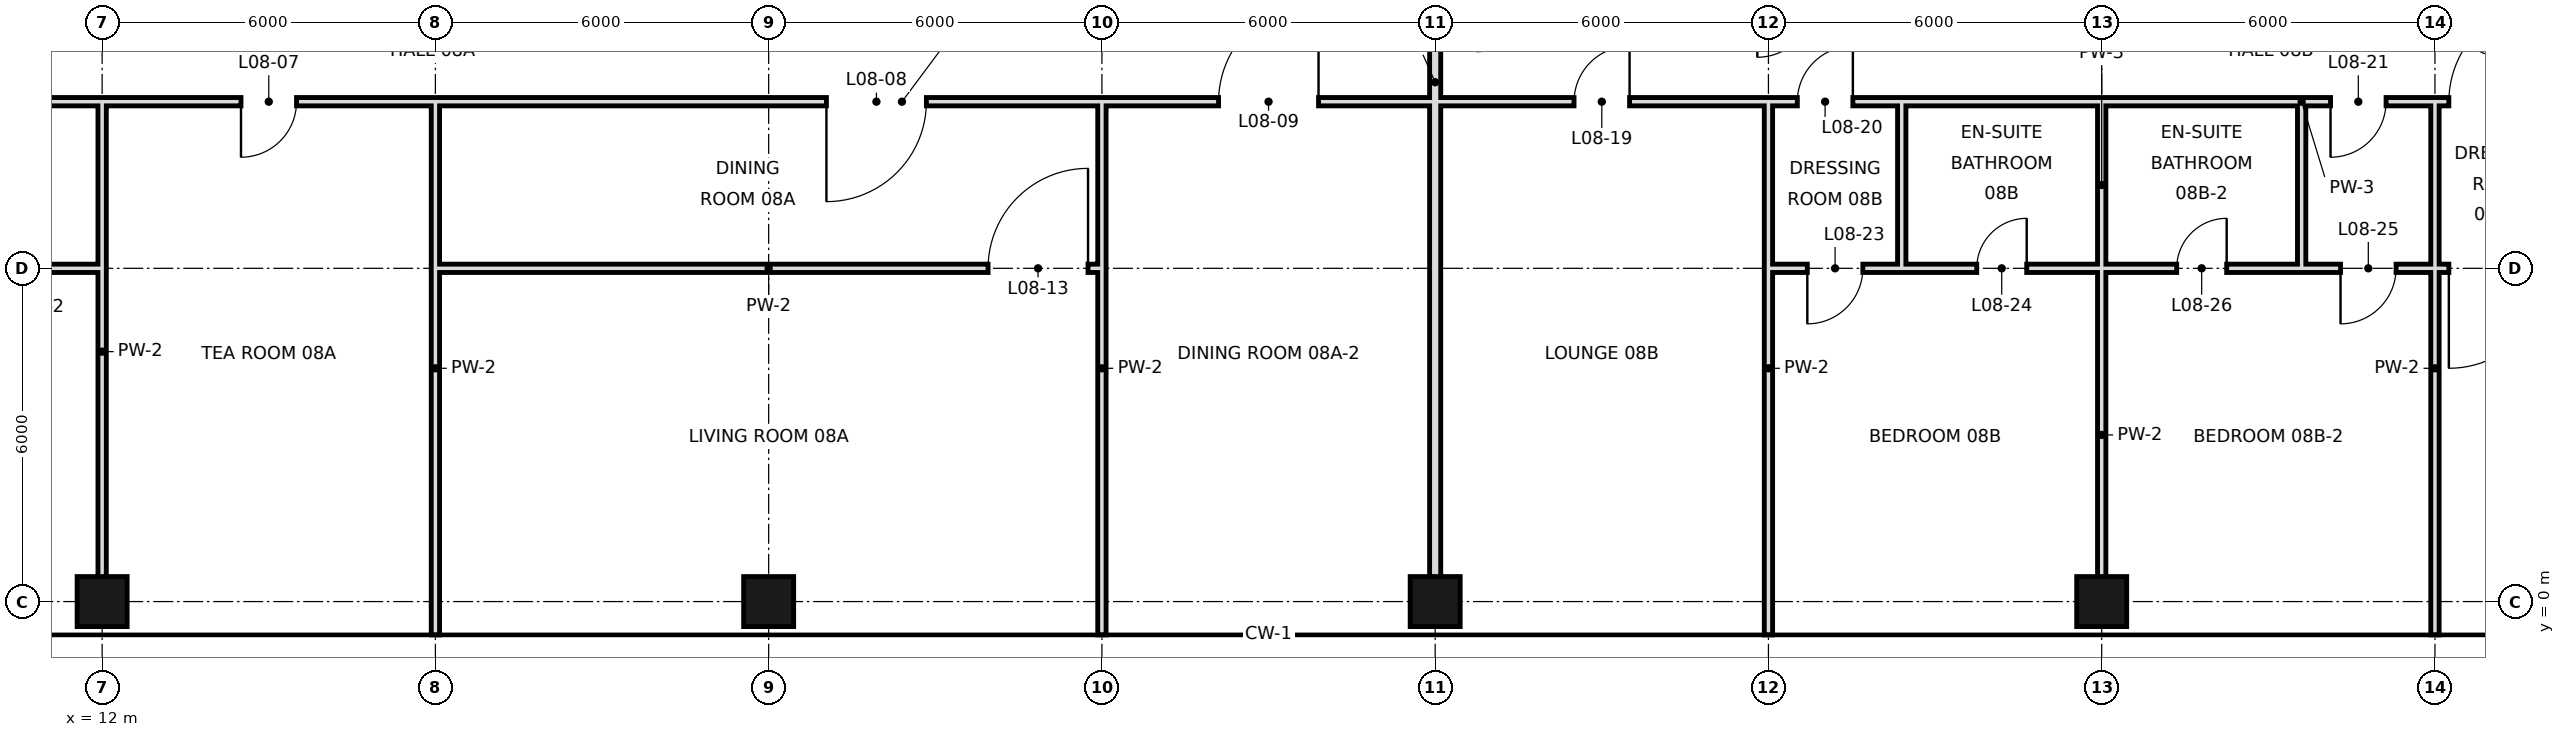
"""IFC4 building model, lengths in metres.
Left out: names, types, materials, properties, quantities, classifications, styles, units other than length and angle.
Written with IfcOpenShell. Run it as: python <this file> out.ifc"""

import sys

from ifc_helpers import new_model, si_unit, direction, frame, frame_2d, origin, origin_2d, place, context, subcontext, project, spatial, rectangle, hollow_rectangle, extrude, element, fill, save


model = new_model("IFC4")
c1 = context("Model", 3, precision=1e-05, world=origin(), true_north=direction((0.0, 1.0)))
c2 = subcontext(c1, "Body", "Model", "MODEL_VIEW")
j1 = project(units=[si_unit("LENGTHUNIT", "METRE"), si_unit("PLANEANGLEUNIT", "RADIAN")], contexts=[c1])
p1 = place(None, origin())
s1 = spatial("IfcSite", under=j1, at=p1, CompositionType="ELEMENT")
p2 = place(p1, origin())
s2 = spatial("IfcBuilding", under=s1, at=p2, CompositionType="ELEMENT")
p3 = place(p2, frame((0.0, 0.0, 49.8)))
s3 = spatial("IfcBuildingStorey", under=s2, at=p3, CompositionType="ELEMENT", Elevation=49.8)
for number, where, z_axis, x_axis in (
    (1, (12.0, 0.0, 0.0), (0.0, 0.0, 1.0), (1.0, 0.0, 0.0)),
    (2, (24.0, 0.0, 0.0), (0.0, 0.0, 1.0), (1.0, 0.0, 0.0)),
    (3, (36.0, 0.0, 0.0), (0.0, 0.0, 1.0), (1.0, 0.0, 0.0)),
    (4, (48.0, 0.0, 0.0), (0.0, 0.0, 1.0), (1.0, 0.0, 0.0)),
):
    element("IfcColumn", number, at=place(p3, frame(where, z_axis=z_axis, x_axis=x_axis)), inside=s3, PredefinedType="COLUMN", context=c2, shape_type="SweptSolid", body=[
        extrude(hollow_rectangle(XDim=0.9, YDim=0.9, WallThickness=0.045, at=origin_2d()), origin(), (0.0, 0.0, 1.0), 3.6),
    ])
p4 = place(p3, frame((12.0, 0.0, 0.0), z_axis=(0.0, 0.0, 1.0), x_axis=(0.0, 1.0, 0.0)))
e5 = element("IfcWall", 5, at=p4, inside=s3, PredefinedType="PARTITIONING", context=c2, shape_type="SweptSolid", body=[
    extrude(rectangle(XDim=9.0, YDim=0.15, at=frame_2d((4.5, 0.0))), origin(), (0.0, 0.0, 1.0), 2.72),
])
for number, where, z_axis, x_axis in (
    (6, (18.0, -0.6, 0.0), (0.0, 0.0, 1.0), (0.0, 1.0, 0.0)),
    (7, (30.0, -0.6, 0.0), (0.0, 0.0, 1.0), (0.0, 1.0, 0.0)),
):
    element("IfcWall", number, at=place(p3, frame(where, z_axis=z_axis, x_axis=x_axis)), inside=s3, PredefinedType="PARTITIONING", context=c2, shape_type="SweptSolid", body=[
        extrude(rectangle(XDim=9.6, YDim=0.15, at=frame_2d((4.8, 0.0))), origin(), (0.0, 0.0, 1.0), 2.72),
    ])
p5 = place(p3, frame((36.0, 0.0, 0.0), z_axis=(0.0, 0.0, 1.0), x_axis=(0.0, 1.0, 0.0)))
e8 = element("IfcWall", 8, at=p5, inside=s3, PredefinedType="SOLIDWALL", context=c2, shape_type="SweptSolid", body=[
    extrude(rectangle(XDim=18.7, YDim=0.2, at=frame_2d((9.35, 0.0))), origin(), (0.0, 0.0, 1.0), 2.72),
])
p6 = place(p3, frame((42.0, -0.6, 0.0), z_axis=(0.0, 0.0, 1.0), x_axis=(0.0, 1.0, 0.0)))
e9 = element("IfcWall", 9, at=p6, inside=s3, PredefinedType="PARTITIONING", context=c2, shape_type="SweptSolid", body=[
    extrude(rectangle(XDim=9.6, YDim=0.15, at=frame_2d((4.8, 0.0))), origin(), (0.0, 0.0, 1.0), 2.72),
])
p7 = place(p3, frame((44.4, 6.0, 0.0), z_axis=(0.0, 0.0, 1.0), x_axis=(0.0, 1.0, 0.0)))
e10 = element("IfcWall", 10, at=p7, inside=s3, PredefinedType="PARTITIONING", context=c2, shape_type="SweptSolid", body=[
    extrude(rectangle(XDim=3.0, YDim=0.15, at=frame_2d((1.5, 0.0))), origin(), (0.0, 0.0, 1.0), 3.42),
])
p8 = place(p3, frame((48.0, 0.0, 0.0), z_axis=(0.0, 0.0, 1.0), x_axis=(0.0, 1.0, 0.0)))
e11 = element("IfcWall", 11, at=p8, inside=s3, PredefinedType="PARTITIONING", context=c2, shape_type="SweptSolid", body=[
    extrude(rectangle(XDim=6.0, YDim=0.15, at=frame_2d((3.0, 0.0))), origin(), (0.0, 0.0, 1.0), 2.72),
])
p9 = place(p3, frame((48.0, 6.0, 0.0), z_axis=(0.0, 0.0, 1.0), x_axis=(0.0, 1.0, 0.0)))
e12 = element("IfcWall", 12, at=p9, inside=s3, PredefinedType="PARTITIONING", context=c2, shape_type="SweptSolid", body=[
    extrude(rectangle(XDim=3.0, YDim=0.15, at=frame_2d((1.5, 0.0))), origin(), (0.0, 0.0, 1.0), 2.72),
])
p10 = place(p3, frame((51.6, 6.0, 0.0), z_axis=(0.0, 0.0, 1.0), x_axis=(0.0, 1.0, 0.0)))
e13 = element("IfcWall", 13, at=p10, inside=s3, PredefinedType="PARTITIONING", context=c2, shape_type="SweptSolid", body=[
    extrude(rectangle(XDim=3.0, YDim=0.15, at=frame_2d((1.5, 0.0))), origin(), (0.0, 0.0, 1.0), 3.42),
])
p11 = place(p3, frame((54.0, -0.6, 0.0), z_axis=(0.0, 0.0, 1.0), x_axis=(0.0, 1.0, 0.0)))
e14 = element("IfcWall", 14, at=p11, inside=s3, PredefinedType="PARTITIONING", context=c2, shape_type="SweptSolid", body=[
    extrude(rectangle(XDim=9.6, YDim=0.15, at=frame_2d((4.8, 0.0))), origin(), (0.0, 0.0, 1.0), 3.42),
])
p12 = place(p3, frame((8.4, 6.0, 0.0), z_axis=(0.0, 0.0, 1.0), x_axis=(1.0, 0.0, 0.0)))
e15 = element("IfcWall", 15, at=p12, inside=s3, PredefinedType="PARTITIONING", context=c2, shape_type="SweptSolid", body=[
    extrude(rectangle(XDim=3.6, YDim=0.15, at=frame_2d((1.8, 0.0))), origin(), (0.0, 0.0, 1.0), 2.97),
])
p13 = place(p12, frame((0.88, 0.0, 0.0)))
e16 = element("IfcOpeningElement", 16, at=p13, cuts=e15, PredefinedType="OPENING", context=c2, shape_type="SweptSolid", body=[
    extrude(rectangle(XDim=1.0, YDim=2.4, at=frame_2d((0.5, 1.2))), frame((0.0, 0.085, 0.0), z_axis=(0.0, -1.0, 0.0), x_axis=(1.0, 0.0, 0.0)), (0.0, 0.0, 1.0), 0.17),
])
p14 = place(p3, frame((18.0, 6.0, 0.0), z_axis=(0.0, 0.0, 1.0), x_axis=(1.0, 0.0, 0.0)))
e17 = element("IfcWall", 17, at=p14, inside=s3, PredefinedType="PARTITIONING", context=c2, shape_type="SweptSolid", body=[
    extrude(rectangle(XDim=12.0, YDim=0.15, at=frame_2d((6.0, 0.0))), origin(), (0.0, 0.0, 1.0), 2.97),
])
p15 = place(p14, frame((9.95, 0.0, 0.0)))
e18 = element("IfcOpeningElement", 18, at=p15, cuts=e17, PredefinedType="OPENING", context=c2, shape_type="SweptSolid", body=[
    extrude(rectangle(XDim=1.8, YDim=2.4, at=frame_2d((0.9, 1.2))), frame((0.0, 0.085, 0.0), z_axis=(0.0, -1.0, 0.0), x_axis=(1.0, 0.0, 0.0)), (0.0, 0.0, 1.0), 0.17),
])
p16 = place(p3, frame((42.0, 6.0, 0.0), z_axis=(0.0, 0.0, 1.0), x_axis=(1.0, 0.0, 0.0)))
e19 = element("IfcWall", 19, at=p16, inside=s3, PredefinedType="PARTITIONING", context=c2, shape_type="SweptSolid", body=[
    extrude(rectangle(XDim=2.4, YDim=0.15, at=frame_2d((1.2, 0.0))), origin(), (0.0, 0.0, 1.0), 2.97),
])
p17 = place(p16, frame((0.7, 0.0, 0.0)))
e20 = element("IfcOpeningElement", 20, at=p17, cuts=e19, PredefinedType="OPENING", context=c2, shape_type="SweptSolid", body=[
    extrude(rectangle(XDim=1.0, YDim=2.4, at=frame_2d((0.5, 1.2))), frame((0.0, 0.085, 0.0), z_axis=(0.0, -1.0, 0.0), x_axis=(1.0, 0.0, 0.0)), (0.0, 0.0, 1.0), 0.17),
])
p18 = place(p3, frame((51.6, 6.0, 0.0), z_axis=(0.0, 0.0, 1.0), x_axis=(1.0, 0.0, 0.0)))
e21 = element("IfcWall", 21, at=p18, inside=s3, PredefinedType="PARTITIONING", context=c2, shape_type="SweptSolid", body=[
    extrude(rectangle(XDim=14.4, YDim=0.15, at=frame_2d((7.2, 0.0))), origin(), (0.0, 0.0, 1.0), 2.52),
])
p19 = place(p18, frame((0.7, 0.0, 0.0)))
e22 = element("IfcOpeningElement", 22, at=p19, cuts=e21, PredefinedType="OPENING", context=c2, shape_type="SweptSolid", body=[
    extrude(rectangle(XDim=1.0, YDim=2.4, at=frame_2d((0.5, 1.2))), frame((0.0, 0.085, 0.0), z_axis=(0.0, -1.0, 0.0), x_axis=(1.0, 0.0, 0.0)), (0.0, 0.0, 1.0), 0.17),
])
p20 = place(p18, frame((2.65, 0.0, 0.0)))
e23 = element("IfcOpeningElement", 23, at=p20, cuts=e21, PredefinedType="OPENING", context=c2, shape_type="SweptSolid", body=[
    extrude(rectangle(XDim=1.8, YDim=2.4, at=frame_2d((0.9, 1.2))), frame((0.0, 0.085, 0.0), z_axis=(0.0, -1.0, 0.0), x_axis=(1.0, 0.0, 0.0)), (0.0, 0.0, 1.0), 0.17),
])
p21 = place(p3, frame((44.4, 6.0, 0.0), z_axis=(0.0, 0.0, 1.0), x_axis=(1.0, 0.0, 0.0)))
e24 = element("IfcWall", 24, at=p21, inside=s3, PredefinedType="PARTITIONING", context=c2, shape_type="SweptSolid", body=[
    extrude(rectangle(XDim=7.2, YDim=0.15, at=frame_2d((3.6, 0.0))), origin(), (0.0, 0.0, 1.0), 2.52),
])
p22 = place(p21, frame((1.35, 0.0, 0.0)))
e25 = element("IfcOpeningElement", 25, at=p22, cuts=e24, PredefinedType="OPENING", context=c2, shape_type="SweptSolid", body=[
    extrude(rectangle(XDim=0.9, YDim=2.4, at=frame_2d((0.45, 1.2))), frame((0.0, 0.085, 0.0), z_axis=(0.0, -1.0, 0.0), x_axis=(1.0, 0.0, 0.0)), (0.0, 0.0, 1.0), 0.17),
])
p23 = place(p21, frame((4.95, 0.0, 0.0)))
e26 = element("IfcOpeningElement", 26, at=p23, cuts=e24, PredefinedType="OPENING", context=c2, shape_type="SweptSolid", body=[
    extrude(rectangle(XDim=0.9, YDim=2.4, at=frame_2d((0.45, 1.2))), frame((0.0, 0.085, 0.0), z_axis=(0.0, -1.0, 0.0), x_axis=(1.0, 0.0, 0.0)), (0.0, 0.0, 1.0), 0.17),
])
p24 = place(p3, frame((8.4, 9.0, 0.0), z_axis=(0.0, 0.0, 1.0), x_axis=(1.0, 0.0, 0.0)))
e27 = element("IfcWall", 27, at=p24, inside=s3, PredefinedType="PARTITIONING", context=c2, shape_type="SweptSolid", body=[
    extrude(rectangle(XDim=36.0, YDim=0.15, at=frame_2d((18.0, 0.0))), origin(), (0.0, 0.0, 1.0), 3.42),
])
p25 = place(p24, frame((0.88, 0.0, 0.0)))
e28 = element("IfcOpeningElement", 28, at=p25, cuts=e27, PredefinedType="OPENING", context=c2, shape_type="SweptSolid", body=[
    extrude(rectangle(XDim=1.0, YDim=2.4, at=frame_2d((0.5, 1.2))), frame((0.0, 0.085, 0.0), z_axis=(0.0, -1.0, 0.0), x_axis=(1.0, 0.0, 0.0)), (0.0, 0.0, 1.0), 0.17),
])
p26 = place(p24, frame((6.1, 0.0, 0.0)))
e29 = element("IfcOpeningElement", 29, at=p26, cuts=e27, PredefinedType="OPENING", context=c2, shape_type="SweptSolid", body=[
    extrude(rectangle(XDim=1.0, YDim=2.4, at=frame_2d((0.5, 1.2))), frame((0.0, 0.085, 0.0), z_axis=(0.0, -1.0, 0.0), x_axis=(1.0, 0.0, 0.0)), (0.0, 0.0, 1.0), 0.17),
])
p27 = place(p24, frame((16.64, 0.0, 0.0)))
e30 = element("IfcOpeningElement", 30, at=p27, cuts=e27, PredefinedType="OPENING", context=c2, shape_type="SweptSolid", body=[
    extrude(rectangle(XDim=1.8, YDim=2.4, at=frame_2d((0.9, 1.2))), frame((0.0, 0.085, 0.0), z_axis=(0.0, -1.0, 0.0), x_axis=(1.0, 0.0, 0.0)), (0.0, 0.0, 1.0), 0.17),
])
p28 = place(p24, frame((23.7, 0.0, 0.0)))
e31 = element("IfcOpeningElement", 31, at=p28, cuts=e27, PredefinedType="OPENING", context=c2, shape_type="SweptSolid", body=[
    extrude(rectangle(XDim=1.8, YDim=2.4, at=frame_2d((0.9, 1.2))), frame((0.0, 0.085, 0.0), z_axis=(0.0, -1.0, 0.0), x_axis=(1.0, 0.0, 0.0)), (0.0, 0.0, 1.0), 0.17),
])
p29 = place(p24, frame((30.1, 0.0, 0.0)))
e32 = element("IfcOpeningElement", 32, at=p29, cuts=e27, PredefinedType="OPENING", context=c2, shape_type="SweptSolid", body=[
    extrude(rectangle(XDim=1.0, YDim=2.4, at=frame_2d((0.5, 1.2))), frame((0.0, 0.085, 0.0), z_axis=(0.0, -1.0, 0.0), x_axis=(1.0, 0.0, 0.0)), (0.0, 0.0, 1.0), 0.17),
])
p30 = place(p24, frame((34.12, 0.0, 0.0)))
e33 = element("IfcOpeningElement", 33, at=p30, cuts=e27, PredefinedType="OPENING", context=c2, shape_type="SweptSolid", body=[
    extrude(rectangle(XDim=1.0, YDim=2.4, at=frame_2d((0.5, 1.2))), frame((0.0, 0.085, 0.0), z_axis=(0.0, -1.0, 0.0), x_axis=(1.0, 0.0, 0.0)), (0.0, 0.0, 1.0), 0.17),
])
p31 = place(p3, frame((51.6, 9.0, 0.0), z_axis=(0.0, 0.0, 1.0), x_axis=(1.0, 0.0, 0.0)))
e34 = element("IfcWall", 34, at=p31, inside=s3, PredefinedType="PARTITIONING", context=c2, shape_type="SweptSolid", body=[
    extrude(rectangle(XDim=15.0, YDim=0.15, at=frame_2d((7.5, 0.0))), origin(), (0.0, 0.0, 1.0), 3.42),
])
p32 = place(p31, frame((0.52, 0.0, 0.0)))
e35 = element("IfcOpeningElement", 35, at=p32, cuts=e34, PredefinedType="OPENING", context=c2, shape_type="SweptSolid", body=[
    extrude(rectangle(XDim=1.0, YDim=2.4, at=frame_2d((0.5, 1.2))), frame((0.0, 0.085, 0.0), z_axis=(0.0, -1.0, 0.0), x_axis=(1.0, 0.0, 0.0)), (0.0, 0.0, 1.0), 0.17),
])
p33 = place(p31, frame((2.65, 0.0, 0.0)))
e36 = element("IfcOpeningElement", 36, at=p33, cuts=e34, PredefinedType="OPENING", context=c2, shape_type="SweptSolid", body=[
    extrude(rectangle(XDim=1.8, YDim=2.4, at=frame_2d((0.9, 1.2))), frame((0.0, 0.085, 0.0), z_axis=(0.0, -1.0, 0.0), x_axis=(1.0, 0.0, 0.0)), (0.0, 0.0, 1.0), 0.17),
])
p34 = place(p3, frame((44.4, 9.0, 0.0), z_axis=(0.0, 0.0, 1.0), x_axis=(1.0, 0.0, 0.0)))
e37 = element("IfcWall", 37, at=p34, inside=s3, PredefinedType="PARTITIONING", context=c2, shape_type="SweptSolid", body=[
    extrude(rectangle(XDim=7.2, YDim=0.15, at=frame_2d((3.6, 0.0))), origin(), (0.0, 0.0, 1.0), 3.42),
])
p35 = place(p26, frame((1.0, 0.0, 0.0), z_axis=(0.0, 0.0, 1.0), x_axis=(-1.0, 0.0, 0.0)))
e38 = element("IfcDoor", 38, at=p35, inside=s3, OperationType="SINGLE_SWING_RIGHT", PredefinedType="DOOR", context=c2, shape_type="SweptSolid", body=[
    extrude(rectangle(XDim=1.0, YDim=2.4, at=frame_2d((0.5, 1.2))), frame((0.0, 0.025, 0.0), z_axis=(0.0, -1.0, 0.0), x_axis=(1.0, 0.0, 0.0)), (0.0, 0.0, 1.0), 0.05),
])
fill(e29, e38)
p36 = place(p27, frame((1.8, 0.0, 0.0), z_axis=(0.0, 0.0, 1.0), x_axis=(-1.0, 0.0, 0.0)))
e39 = element("IfcDoor", 39, at=p36, inside=s3, OperationType="SINGLE_SWING_RIGHT", PredefinedType="DOOR", context=c2, shape_type="SweptSolid", body=[
    extrude(rectangle(XDim=1.8, YDim=2.4, at=frame_2d((0.9, 1.2))), frame((0.0, 0.025, 0.0), z_axis=(0.0, -1.0, 0.0), x_axis=(1.0, 0.0, 0.0)), (0.0, 0.0, 1.0), 0.05),
])
fill(e30, e39)
p37 = place(p28, frame((1.8, 0.0, 0.0), z_axis=(0.0, 0.0, 1.0), x_axis=(-1.0, 0.0, 0.0)))
e40 = element("IfcDoor", 40, at=p37, inside=s3, OperationType="SINGLE_SWING_LEFT", PredefinedType="DOOR", context=c2, shape_type="SweptSolid", body=[
    extrude(rectangle(XDim=1.8, YDim=2.4, at=frame_2d((0.9, 1.2))), frame((0.0, 0.025, 0.0), z_axis=(0.0, -1.0, 0.0), x_axis=(1.0, 0.0, 0.0)), (0.0, 0.0, 1.0), 0.05),
])
fill(e31, e40)
p38 = place(p15, frame((1.8, 0.0, 0.0), z_axis=(0.0, 0.0, 1.0), x_axis=(-1.0, 0.0, 0.0)))
e41 = element("IfcDoor", 41, at=p38, inside=s3, OperationType="SINGLE_SWING_LEFT", PredefinedType="DOOR", context=c2, shape_type="SweptSolid", body=[
    extrude(rectangle(XDim=1.8, YDim=2.4, at=frame_2d((0.9, 1.2))), frame((0.0, 0.025, 0.0), z_axis=(0.0, -1.0, 0.0), x_axis=(1.0, 0.0, 0.0)), (0.0, 0.0, 1.0), 0.05),
])
fill(e18, e41)
p39 = place(p29, frame((1.0, 0.0, 0.0), z_axis=(0.0, 0.0, 1.0), x_axis=(-1.0, 0.0, 0.0)))
e42 = element("IfcDoor", 42, at=p39, inside=s3, OperationType="SINGLE_SWING_LEFT", PredefinedType="DOOR", context=c2, shape_type="SweptSolid", body=[
    extrude(rectangle(XDim=1.0, YDim=2.4, at=frame_2d((0.5, 1.2))), frame((0.0, 0.025, 0.0), z_axis=(0.0, -1.0, 0.0), x_axis=(1.0, 0.0, 0.0)), (0.0, 0.0, 1.0), 0.05),
])
fill(e32, e42)
p40 = place(p30, frame((1.0, 0.0, 0.0), z_axis=(0.0, 0.0, 1.0), x_axis=(-1.0, 0.0, 0.0)))
e43 = element("IfcDoor", 43, at=p40, inside=s3, OperationType="SINGLE_SWING_LEFT", PredefinedType="DOOR", context=c2, shape_type="SweptSolid", body=[
    extrude(rectangle(XDim=1.0, YDim=2.4, at=frame_2d((0.5, 1.2))), frame((0.0, 0.025, 0.0), z_axis=(0.0, -1.0, 0.0), x_axis=(1.0, 0.0, 0.0)), (0.0, 0.0, 1.0), 0.05),
])
fill(e33, e43)
p41 = place(p32, frame((1.0, 0.0, 0.0), z_axis=(0.0, 0.0, 1.0), x_axis=(-1.0, 0.0, 0.0)))
e44 = element("IfcDoor", 44, at=p41, inside=s3, OperationType="SINGLE_SWING_RIGHT", PredefinedType="DOOR", context=c2, shape_type="SweptSolid", body=[
    extrude(rectangle(XDim=1.0, YDim=2.4, at=frame_2d((0.5, 1.2))), frame((0.0, 0.025, 0.0), z_axis=(0.0, -1.0, 0.0), x_axis=(1.0, 0.0, 0.0)), (0.0, 0.0, 1.0), 0.05),
])
fill(e35, e44)
p42 = place(p33, frame((1.8, 0.0, 0.0), z_axis=(0.0, 0.0, 1.0), x_axis=(-1.0, 0.0, 0.0)))
e45 = element("IfcDoor", 45, at=p42, inside=s3, OperationType="SINGLE_SWING_LEFT", PredefinedType="DOOR", context=c2, shape_type="SweptSolid", body=[
    extrude(rectangle(XDim=1.8, YDim=2.4, at=frame_2d((0.9, 1.2))), frame((0.0, 0.025, 0.0), z_axis=(0.0, -1.0, 0.0), x_axis=(1.0, 0.0, 0.0)), (0.0, 0.0, 1.0), 0.05),
])
fill(e36, e45)
p43 = place(p17, frame((1.0, 0.0, 0.0), z_axis=(0.0, 0.0, 1.0), x_axis=(-1.0, 0.0, 0.0)))
e46 = element("IfcDoor", 46, at=p43, inside=s3, OperationType="SINGLE_SWING_RIGHT", PredefinedType="DOOR", context=c2, shape_type="SweptSolid", body=[
    extrude(rectangle(XDim=1.0, YDim=2.4, at=frame_2d((0.5, 1.2))), frame((0.0, 0.025, 0.0), z_axis=(0.0, -1.0, 0.0), x_axis=(1.0, 0.0, 0.0)), (0.0, 0.0, 1.0), 0.05),
])
fill(e20, e46)
p44 = place(p22, frame((0.9, 0.0, 0.0), z_axis=(0.0, 0.0, 1.0), x_axis=(-1.0, 0.0, 0.0)))
e47 = element("IfcDoor", 47, at=p44, inside=s3, OperationType="SINGLE_SWING_LEFT", PredefinedType="DOOR", context=c2, shape_type="SweptSolid", body=[
    extrude(rectangle(XDim=0.9, YDim=2.4, at=frame_2d((0.45, 1.2))), frame((0.0, 0.025, 0.0), z_axis=(0.0, -1.0, 0.0), x_axis=(1.0, 0.0, 0.0)), (0.0, 0.0, 1.0), 0.05),
])
fill(e25, e47)
p45 = place(p19, frame((1.0, 0.0, 0.0), z_axis=(0.0, 0.0, 1.0), x_axis=(-1.0, 0.0, 0.0)))
e48 = element("IfcDoor", 48, at=p45, inside=s3, OperationType="SINGLE_SWING_RIGHT", PredefinedType="DOOR", context=c2, shape_type="SweptSolid", body=[
    extrude(rectangle(XDim=1.0, YDim=2.4, at=frame_2d((0.5, 1.2))), frame((0.0, 0.025, 0.0), z_axis=(0.0, -1.0, 0.0), x_axis=(1.0, 0.0, 0.0)), (0.0, 0.0, 1.0), 0.05),
])
fill(e22, e48)
p46 = place(p23, frame((0.9, 0.0, 0.0), z_axis=(0.0, 0.0, 1.0), x_axis=(-1.0, 0.0, 0.0)))
e49 = element("IfcDoor", 49, at=p46, inside=s3, OperationType="SINGLE_SWING_LEFT", PredefinedType="DOOR", context=c2, shape_type="SweptSolid", body=[
    extrude(rectangle(XDim=0.9, YDim=2.4, at=frame_2d((0.45, 1.2))), frame((0.0, 0.025, 0.0), z_axis=(0.0, -1.0, 0.0), x_axis=(1.0, 0.0, 0.0)), (0.0, 0.0, 1.0), 0.05),
])
fill(e26, e49)
p47 = place(p20, frame((1.8, 0.0, 0.0), z_axis=(0.0, 0.0, 1.0), x_axis=(-1.0, 0.0, 0.0)))
e50 = element("IfcDoor", 50, at=p47, inside=s3, OperationType="SINGLE_SWING_RIGHT", PredefinedType="DOOR", context=c2, shape_type="SweptSolid", body=[
    extrude(rectangle(XDim=1.8, YDim=2.4, at=frame_2d((0.9, 1.2))), frame((0.0, 0.025, 0.0), z_axis=(0.0, -1.0, 0.0), x_axis=(1.0, 0.0, 0.0)), (0.0, 0.0, 1.0), 0.05),
])
fill(e23, e50)
save(model, sys.argv[1])
